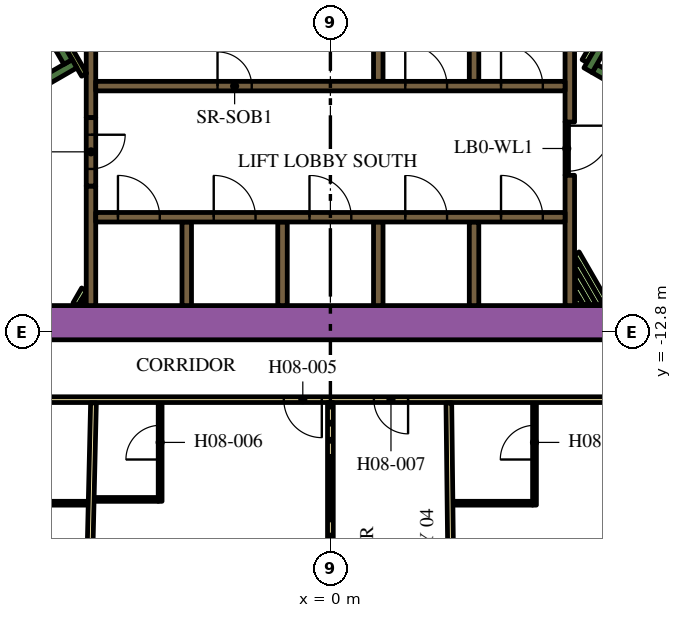
"""IFC4 building model, lengths in metres.
Left out: names, types, materials, properties, quantities, classifications, styles, units other than length and angle.
Written with IfcOpenShell. Run it as: python <this file> out.ifc"""

import sys

from ifc_helpers import new_model, si_unit, direction, frame, frame_2d, origin, place, context, subcontext, project, spatial, rectangle, extrude, element, fill, save


model = new_model("IFC4")
c1 = context("Model", 3, precision=1e-05, world=origin(), true_north=direction((0.0, 1.0)))
c2 = subcontext(c1, "Body", "Model", "MODEL_VIEW")
j1 = project(units=[si_unit("LENGTHUNIT", "METRE"), si_unit("PLANEANGLEUNIT", "RADIAN")], contexts=[c1])
p1 = place(None, origin())
s1 = spatial("IfcSite", under=j1, at=p1, CompositionType="ELEMENT")
p2 = place(p1, origin())
s2 = spatial("IfcBuilding", under=s1, at=p2, CompositionType="ELEMENT")
p3 = place(p2, frame((0.0, 0.0, 114.9)))
s3 = spatial("IfcBuildingStorey", under=s2, at=p3, CompositionType="ELEMENT", Elevation=114.9)
p4 = place(p3, frame((-12.019, -12.55, 0.0), z_axis=(0.0, 0.0, 1.0), x_axis=(1.0, 0.0, 0.0)))
e1 = element("IfcWall", 1, at=p4, inside=s3, PredefinedType="SOLIDWALL", context=c2, shape_type="SweptSolid", body=[
    extrude(rectangle(XDim=22.083, YDim=0.9, at=frame_2d((11.042, 0.0))), origin(), (0.0, 0.0, 1.0), 3.9),
])
p5 = place(p3, frame((12.84, -9.261, 0.0), z_axis=(0.0, 0.0, 1.0), x_axis=(-0.866013990052, 0.500019768644, 0.0)))
e2 = element("IfcWall", 2, at=p5, inside=s3, PredefinedType="SOLIDWALL", context=c2, shape_type="SweptSolid", body=[
    extrude(rectangle(XDim=6.8, YDim=0.25, at=frame_2d((3.4, 0.0))), origin(), (0.0, 0.0, 1.0), 3.9),
])
p6 = place(p3, frame((6.78, -5.906, 0.0), z_axis=(0.0, 0.0, 1.0), x_axis=(0.500223362819, 0.865896406789, 0.0)))
e3 = element("IfcWall", 3, at=p6, inside=s3, PredefinedType="SOLIDWALL", context=c2, shape_type="SweptSolid", body=[
    extrude(rectangle(XDim=0.675, YDim=0.25, at=frame_2d((0.337, 0.0))), origin(), (0.0, 0.0, 1.0), 3.9),
])
p7 = place(p3, frame((-12.84, -9.261, 0.0), z_axis=(0.0, 0.0, 1.0), x_axis=(0.866016039709, 0.500016218704, 0.0)))
e4 = element("IfcWall", 4, at=p7, inside=s3, PredefinedType="SOLIDWALL", context=c2, shape_type="SweptSolid", body=[
    extrude(rectangle(XDim=7.05, YDim=0.25, at=frame_2d((3.525, 0.0))), origin(), (0.0, 0.0, 1.0), 3.9),
])
p8 = place(p3, frame((-6.905, -5.69, 0.0), z_axis=(0.0, 0.0, 1.0), x_axis=(-0.500402024738, 0.865793170242, 0.0)))
e5 = element("IfcWall", 5, at=p8, inside=s3, PredefinedType="SOLIDWALL", context=c2, shape_type="SweptSolid", body=[
    extrude(rectangle(XDim=0.425, YDim=0.25, at=frame_2d((0.212, 0.0))), origin(), (0.0, 0.0, 1.0), 3.9),
])
p9 = place(p3, frame((-3.78, -12.1, 0.0), z_axis=(0.0, 0.0, 1.0), x_axis=(0.0, 1.0, 0.0)))
e6 = element("IfcWall", 6, at=p9, inside=s3, PredefinedType="SOLIDWALL", context=c2, shape_type="SweptSolid", body=[
    extrude(rectangle(XDim=2.2, YDim=0.25, at=frame_2d((1.1, 0.0))), origin(), (0.0, 0.0, 1.0), 3.9),
])
p10 = place(p3, frame((-6.3, -12.1, 0.0), z_axis=(0.0, 0.0, 1.0), x_axis=(0.0, 1.0, 0.0)))
e7 = element("IfcWall", 7, at=p10, inside=s3, PredefinedType="SOLIDWALL", context=c2, shape_type="SweptSolid", body=[
    extrude(rectangle(XDim=3.146, YDim=0.25, at=frame_2d((1.573, 0.0))), origin(), (0.0, 0.0, 1.0), 3.9),
])
for number, where, z_axis, x_axis in (
    (8, (3.78, -4.0, 0.0), (0.0, 0.0, 1.0), (0.0, -1.0, 0.0)),
    (9, (1.26, -4.0, 0.0), (0.0, 0.0, 1.0), (0.0, -1.0, 0.0)),
):
    element("IfcWall", number, at=place(p3, frame(where, z_axis=z_axis, x_axis=x_axis)), inside=s3, PredefinedType="SOLIDWALL", context=c2, shape_type="SweptSolid", body=[
        extrude(rectangle(XDim=2.2, YDim=0.25, at=frame_2d((1.1, 0.0))), origin(), (0.0, 0.0, 1.0), 3.9),
    ])
p11 = place(p3, frame((-6.3, -3.75, 0.0), z_axis=(0.0, 0.0, 1.0), x_axis=(0.0, -1.0, 0.0)))
e10 = element("IfcWall", 10, at=p11, inside=s3, PredefinedType="SOLIDWALL", context=c2, shape_type="SweptSolid", body=[
    extrude(rectangle(XDim=3.404, YDim=0.25, at=frame_2d((1.702, 0.0))), origin(), (0.0, 0.0, 1.0), 3.9),
])
p12 = place(p3, frame((6.3, -7.27, 0.0), z_axis=(0.0, 0.0, 1.0), x_axis=(0.0, 1.0, 0.0)))
e11 = element("IfcWall", 11, at=p12, inside=s3, PredefinedType="SOLIDWALL", context=c2, shape_type="SweptSolid", body=[
    extrude(rectangle(XDim=3.586, YDim=0.25, at=frame_2d((1.793, 0.0))), origin(), (0.0, 0.0, 1.0), 3.9),
])
p13 = place(p3, frame((6.3, -12.1, 0.0), z_axis=(0.0, 0.0, 1.0), x_axis=(0.0, 1.0, 0.0)))
e12 = element("IfcWall", 12, at=p13, inside=s3, PredefinedType="SOLIDWALL", context=c2, shape_type="SweptSolid", body=[
    extrude(rectangle(XDim=3.428, YDim=0.25, at=frame_2d((1.714, 0.0))), origin(), (0.0, 0.0, 1.0), 3.9),
])
for number, where, z_axis, x_axis in (
    (13, (3.78, -12.1, 0.0), (0.0, 0.0, 1.0), (0.0, 1.0, 0.0)),
    (14, (1.26, -12.1, 0.0), (0.0, 0.0, 1.0), (0.0, 1.0, 0.0)),
    (15, (-1.26, -12.1, 0.0), (0.0, 0.0, 1.0), (0.0, 1.0, 0.0)),
):
    element("IfcWall", number, at=place(p3, frame(where, z_axis=z_axis, x_axis=x_axis)), inside=s3, PredefinedType="SOLIDWALL", context=c2, shape_type="SweptSolid", body=[
        extrude(rectangle(XDim=2.2, YDim=0.25, at=frame_2d((1.1, 0.0))), origin(), (0.0, 0.0, 1.0), 3.9),
    ])
p14 = place(p3, frame((-6.708, -12.068, 0.0), z_axis=(0.0, 0.0, 1.0), x_axis=(0.500000789788, 0.8660249478, 0.0)))
e16 = element("IfcWall", 16, at=p14, inside=s3, PredefinedType="PARTITIONING", context=c2, shape_type="SweptSolid", body=[
    extrude(rectangle(XDim=0.456, YDim=0.15, at=frame_2d((0.228, 0.0))), origin(), (0.0, 0.0, 1.0), 2.75),
])
p15 = place(p3, frame((-6.534, -12.068, 0.0), z_axis=(0.0, 0.0, 1.0), x_axis=(0.500240224089, 0.865886665912, 0.0)))
e17 = element("IfcWall", 17, at=p15, inside=s3, PredefinedType="PARTITIONING", context=c2, shape_type="SweptSolid", body=[
    extrude(rectangle(XDim=0.109, YDim=0.15, at=frame_2d((0.054, 0.0))), origin(), (0.0, 0.0, 1.0), 2.75),
])
p16 = place(p3, frame((-6.48, -6.027, 0.0), z_axis=(0.0, 0.0, 1.0), x_axis=(-0.499927229454, 0.866067413802, 0.0)))
e18 = element("IfcWall", 18, at=p16, inside=s3, PredefinedType="PARTITIONING", context=c2, shape_type="SweptSolid", body=[
    extrude(rectangle(XDim=0.929, YDim=0.15, at=frame_2d((0.464, 0.0))), origin(), (0.0, 0.0, 1.0), 3.9),
])
p17 = place(p3, frame((6.48, -10.726, 0.0), z_axis=(0.0, 0.0, 1.0), x_axis=(0.500017819788, -0.86601511528, 0.0)))
e19 = element("IfcWall", 19, at=p17, inside=s3, PredefinedType="PARTITIONING", context=c2, shape_type="SweptSolid", body=[
    extrude(rectangle(XDim=1.55, YDim=0.15, at=frame_2d((0.775, 0.0))), origin(), (0.0, 0.0, 1.0), 2.75),
])
p18 = place(p3, frame((6.48, -11.026, 0.0), z_axis=(0.0, 0.0, 1.0), x_axis=(0.49995654735, -0.86605048973, 0.0)))
e20 = element("IfcWall", 20, at=p18, inside=s3, PredefinedType="PARTITIONING", context=c2, shape_type="SweptSolid", body=[
    extrude(rectangle(XDim=1.204, YDim=0.15, at=frame_2d((0.602, 0.0))), origin(), (0.0, 0.0, 1.0), 2.75),
])
p19 = place(p3, frame((6.48, -11.326, 0.0), z_axis=(0.0, 0.0, 1.0), x_axis=(0.500059337743, -0.865991142412, 0.0)))
e21 = element("IfcWall", 21, at=p19, inside=s3, PredefinedType="PARTITIONING", context=c2, shape_type="SweptSolid", body=[
    extrude(rectangle(XDim=0.857, YDim=0.15, at=frame_2d((0.429, 0.0))), origin(), (0.0, 0.0, 1.0), 2.75),
])
p20 = place(p3, frame((6.48, -11.626, 0.0), z_axis=(0.0, 0.0, 1.0), x_axis=(0.500301480982, -0.865851273677, 0.0)))
e22 = element("IfcWall", 22, at=p20, inside=s3, PredefinedType="PARTITIONING", context=c2, shape_type="SweptSolid", body=[
    extrude(rectangle(XDim=0.511, YDim=0.15, at=frame_2d((0.255, 0.0))), origin(), (0.0, 0.0, 1.0), 2.75),
])
p21 = place(p3, frame((6.48, -11.926, 0.0), z_axis=(0.0, 0.0, 1.0), x_axis=(0.500450775723, -0.86576499183, 0.0)))
e23 = element("IfcWall", 23, at=p21, inside=s3, PredefinedType="PARTITIONING", context=c2, shape_type="SweptSolid", body=[
    extrude(rectangle(XDim=0.164, YDim=0.15, at=frame_2d((0.082, 0.0))), origin(), (0.0, 0.0, 1.0), 2.75),
])
p22 = place(p3, frame((6.945, -5.222, 0.0), z_axis=(0.0, 0.0, 1.0), x_axis=(-0.499818422106, -0.866130212453, 0.0)))
e24 = element("IfcWall", 24, at=p22, inside=s3, PredefinedType="PARTITIONING", context=c2, shape_type="SweptSolid", body=[
    extrude(rectangle(XDim=0.514, YDim=0.15, at=frame_2d((0.257, 0.0))), origin(), (0.0, 0.0, 1.0), 2.75),
])
p23 = place(p3, frame((-6.175, -9.775, 0.0), z_axis=(0.0, 0.0, 1.0), x_axis=(1.0, 0.0, 0.0)))
e25 = element("IfcWall", 25, at=p23, inside=s3, PredefinedType="SOLIDWALL", context=c2, shape_type="SweptSolid", body=[
    extrude(rectangle(XDim=12.35, YDim=0.25, at=frame_2d((6.175, 0.0))), origin(), (0.0, 0.0, 1.0), 3.9),
])
p24 = place(p23, frame((0.585, 0.0, 0.0)))
e26 = element("IfcOpeningElement", 26, at=p24, cuts=e25, PredefinedType="OPENING", context=c2, shape_type="SweptSolid", body=[
    extrude(rectangle(XDim=1.1, YDim=2.1, at=frame_2d((0.55, 1.05))), frame((0.0, 0.135, 0.0), z_axis=(0.0, -1.0, 0.0), x_axis=(1.0, 0.0, 0.0)), (0.0, 0.0, 1.0), 0.27),
])
p25 = place(p23, frame((3.105, 0.0, 0.0)))
e27 = element("IfcOpeningElement", 27, at=p25, cuts=e25, PredefinedType="OPENING", context=c2, shape_type="SweptSolid", body=[
    extrude(rectangle(XDim=1.1, YDim=2.1, at=frame_2d((0.55, 1.05))), frame((0.0, 0.135, 0.0), z_axis=(0.0, -1.0, 0.0), x_axis=(1.0, 0.0, 0.0)), (0.0, 0.0, 1.0), 0.27),
])
p26 = place(p23, frame((5.625, 0.0, 0.0)))
e28 = element("IfcOpeningElement", 28, at=p26, cuts=e25, PredefinedType="OPENING", context=c2, shape_type="SweptSolid", body=[
    extrude(rectangle(XDim=1.1, YDim=2.1, at=frame_2d((0.55, 1.05))), frame((0.0, 0.135, 0.0), z_axis=(0.0, -1.0, 0.0), x_axis=(1.0, 0.0, 0.0)), (0.0, 0.0, 1.0), 0.27),
])
p27 = place(p23, frame((8.145, 0.0, 0.0)))
e29 = element("IfcOpeningElement", 29, at=p27, cuts=e25, PredefinedType="OPENING", context=c2, shape_type="SweptSolid", body=[
    extrude(rectangle(XDim=1.1, YDim=2.1, at=frame_2d((0.55, 1.05))), frame((0.0, 0.135, 0.0), z_axis=(0.0, -1.0, 0.0), x_axis=(1.0, 0.0, 0.0)), (0.0, 0.0, 1.0), 0.27),
])
p28 = place(p23, frame((10.665, 0.0, 0.0)))
e30 = element("IfcOpeningElement", 30, at=p28, cuts=e25, PredefinedType="OPENING", context=c2, shape_type="SweptSolid", body=[
    extrude(rectangle(XDim=1.1, YDim=2.1, at=frame_2d((0.55, 1.05))), frame((0.0, 0.135, 0.0), z_axis=(0.0, -1.0, 0.0), x_axis=(1.0, 0.0, 0.0)), (0.0, 0.0, 1.0), 0.27),
])
p29 = place(p3, frame((-6.175, -6.325, 0.0), z_axis=(0.0, 0.0, 1.0), x_axis=(1.0, 0.0, 0.0)))
e31 = element("IfcWall", 31, at=p29, inside=s3, PredefinedType="SOLIDWALL", context=c2, shape_type="SweptSolid", body=[
    extrude(rectangle(XDim=12.35, YDim=0.25, at=frame_2d((6.175, 0.0))), origin(), (0.0, 0.0, 1.0), 3.9),
])
p30 = place(p29, frame((3.205, 0.0, 0.0)))
e32 = element("IfcOpeningElement", 32, at=p30, cuts=e31, PredefinedType="OPENING", context=c2, shape_type="SweptSolid", body=[
    extrude(rectangle(XDim=0.9, YDim=2.1, at=frame_2d((0.45, 1.05))), frame((0.0, 0.135, 0.0), z_axis=(0.0, -1.0, 0.0), x_axis=(1.0, 0.0, 0.0)), (0.0, 0.0, 1.0), 0.27),
])
p31 = place(p29, frame((8.145, 0.0, 0.0)))
e33 = element("IfcOpeningElement", 33, at=p31, cuts=e31, PredefinedType="OPENING", context=c2, shape_type="SweptSolid", body=[
    extrude(rectangle(XDim=1.1, YDim=2.1, at=frame_2d((0.55, 1.05))), frame((0.0, 0.135, 0.0), z_axis=(0.0, -1.0, 0.0), x_axis=(1.0, 0.0, 0.0)), (0.0, 0.0, 1.0), 0.27),
])
p32 = place(p29, frame((10.665, 0.0, 0.0)))
e34 = element("IfcOpeningElement", 34, at=p32, cuts=e31, PredefinedType="OPENING", context=c2, shape_type="SweptSolid", body=[
    extrude(rectangle(XDim=1.1, YDim=2.1, at=frame_2d((0.55, 1.05))), frame((0.0, 0.135, 0.0), z_axis=(0.0, -1.0, 0.0), x_axis=(1.0, 0.0, 0.0)), (0.0, 0.0, 1.0), 0.27),
])
p33 = place(p3, frame((-6.3, -7.154, 0.0), z_axis=(0.0, 0.0, 1.0), x_axis=(0.0, -1.0, 0.0)))
e35 = element("IfcWall", 35, at=p33, inside=s3, PredefinedType="SOLIDWALL", context=c2, shape_type="SweptSolid", body=[
    extrude(rectangle(XDim=1.8, YDim=0.25, at=frame_2d((0.9, 0.0))), origin(), (0.0, 0.0, 1.0), 3.9),
])
p34 = place(p33, frame((0.45, 0.0, 0.0)))
e36 = element("IfcOpeningElement", 36, at=p34, cuts=e35, PredefinedType="OPENING", context=c2, shape_type="SweptSolid", body=[
    extrude(rectangle(XDim=0.9, YDim=2.1, at=frame_2d((0.45, 1.05))), frame((0.0, 0.135, 0.0), z_axis=(0.0, -1.0, 0.0), x_axis=(1.0, 0.0, 0.0)), (0.0, 0.0, 1.0), 0.27),
])
p35 = place(p3, frame((6.22, -7.266, 0.0), z_axis=(0.0, 0.0, 1.0), x_axis=(0.0, -1.0, 0.0)))
e37 = element("IfcWall", 37, at=p35, inside=s3, PredefinedType="PARTITIONING", context=c2, shape_type="SweptSolid", body=[
    extrude(rectangle(XDim=1.4, YDim=0.09, at=frame_2d((0.7, 0.0))), origin(), (0.0, 0.0, 1.0), 2.75),
])
p36 = place(p35, frame((0.1, 0.0, 0.0)))
e38 = element("IfcOpeningElement", 38, at=p36, cuts=e37, PredefinedType="OPENING", context=c2, shape_type="SweptSolid", body=[
    extrude(rectangle(XDim=1.2, YDim=2.1, at=frame_2d((0.6, 1.05))), frame((0.0, 0.055, 0.0), z_axis=(0.0, -1.0, 0.0), x_axis=(1.0, 0.0, 0.0)), (0.0, 0.0, 1.0), 0.11),
])
p37 = place(p3, frame((12.918, -14.575, 0.0), z_axis=(0.0, 0.0, 1.0), x_axis=(-1.0, 0.0, 0.0)))
e39 = element("IfcWall", 39, at=p37, inside=s3, PredefinedType="PARTITIONING", context=c2, shape_type="SweptSolid", body=[
    extrude(rectangle(XDim=25.766, YDim=0.15, at=frame_2d((12.883, 0.0))), origin(), (0.0, 0.0, 1.0), 2.75),
])
p38 = place(p37, frame((24.586, 0.0, 0.0)))
e40 = element("IfcOpeningElement", 40, at=p38, cuts=e39, PredefinedType="OPENING", context=c2, shape_type="SweptSolid", body=[
    extrude(rectangle(XDim=1.0, YDim=2.1, at=frame_2d((0.5, 1.05))), frame((0.0, 0.085, 0.0), z_axis=(0.0, -1.0, 0.0), x_axis=(1.0, 0.0, 0.0)), (0.0, 0.0, 1.0), 0.17),
])
p39 = place(p37, frame((13.144, 0.0, 0.0)))
e41 = element("IfcOpeningElement", 41, at=p39, cuts=e39, PredefinedType="OPENING", context=c2, shape_type="SweptSolid", body=[
    extrude(rectangle(XDim=1.0, YDim=2.1, at=frame_2d((0.5, 1.05))), frame((0.0, 0.085, 0.0), z_axis=(0.0, -1.0, 0.0), x_axis=(1.0, 0.0, 0.0)), (0.0, 0.0, 1.0), 0.17),
])
p40 = place(p37, frame((10.874, 0.0, 0.0)))
e42 = element("IfcOpeningElement", 42, at=p40, cuts=e39, PredefinedType="OPENING", context=c2, shape_type="SweptSolid", body=[
    extrude(rectangle(XDim=0.9, YDim=2.1, at=frame_2d((0.45, 1.05))), frame((0.0, 0.085, 0.0), z_axis=(0.0, -1.0, 0.0), x_axis=(1.0, 0.0, 0.0)), (0.0, 0.0, 1.0), 0.17),
])
p41 = place(p37, frame((0.596, 0.0, 0.0)))
e43 = element("IfcOpeningElement", 43, at=p41, cuts=e39, PredefinedType="OPENING", context=c2, shape_type="SweptSolid", body=[
    extrude(rectangle(XDim=1.0, YDim=2.1, at=frame_2d((0.5, 1.05))), frame((0.0, 0.085, 0.0), z_axis=(0.0, -1.0, 0.0), x_axis=(1.0, 0.0, 0.0)), (0.0, 0.0, 1.0), 0.17),
])
p42 = place(p3, frame((-6.389, -21.269, 0.0), z_axis=(0.0, 0.0, 1.0), x_axis=(0.023377429176, 0.999726710559, 0.0)))
e44 = element("IfcWall", 44, at=p42, inside=s3, PredefinedType="PARTITIONING", context=c2, shape_type="SweptSolid", body=[
    extrude(rectangle(XDim=6.611, YDim=0.15, at=frame_2d((3.305, 0.0))), origin(), (0.0, 0.0, 1.0), 2.75),
])
p43 = place(p3, frame((0.0, -21.344, 0.0), z_axis=(0.0, 0.0, 1.0), x_axis=(0.0, 1.0, 0.0)))
e45 = element("IfcWall", 45, at=p43, inside=s3, PredefinedType="PARTITIONING", context=c2, shape_type="SweptSolid", body=[
    extrude(rectangle(XDim=6.694, YDim=0.15, at=frame_2d((3.347, 0.0))), origin(), (0.0, 0.0, 1.0), 2.75),
])
p44 = place(p3, frame((3.202, -21.916, 0.0), z_axis=(0.0, 0.0, 1.0), x_axis=(-0.011707696285, 0.999931462575, 0.0)))
e46 = element("IfcWall", 46, at=p44, inside=s3, PredefinedType="PARTITIONING", context=c2, shape_type="SweptSolid", body=[
    extrude(rectangle(XDim=7.257, YDim=0.15, at=frame_2d((3.628, 0.0))), origin(), (0.0, 0.0, 1.0), 2.75),
])
p45 = place(p3, frame((-8.438, -17.3, 0.0), z_axis=(0.0, 0.0, 1.0), x_axis=(1.0, 0.0, 0.0)))
e47 = element("IfcWall", 47, at=p45, inside=s3, PredefinedType="PARTITIONING", context=c2, shape_type="SweptSolid", body=[
    extrude(rectangle(XDim=2.06, YDim=0.1, at=frame_2d((1.03, 0.0))), origin(), (0.0, 0.0, 1.0), 2.75),
])
p46 = place(p3, frame((-4.48, -17.25, 0.0), z_axis=(0.0, 0.0, 1.0), x_axis=(0.0, 1.0, 0.0)))
e48 = element("IfcWall", 48, at=p46, inside=s3, PredefinedType="PARTITIONING", context=c2, shape_type="SweptSolid", body=[
    extrude(rectangle(XDim=2.6, YDim=0.1, at=frame_2d((1.3, 0.0))), origin(), (0.0, 0.0, 1.0), 2.75),
])
p47 = place(p46, frame((1.1, 0.0, 0.0)))
e49 = element("IfcOpeningElement", 49, at=p47, cuts=e48, PredefinedType="OPENING", context=c2, shape_type="SweptSolid", body=[
    extrude(rectangle(XDim=0.9, YDim=2.1, at=frame_2d((0.45, 1.05))), frame((0.0, 0.06, 0.0), z_axis=(0.0, -1.0, 0.0), x_axis=(1.0, 0.0, 0.0)), (0.0, 0.0, 1.0), 0.12),
])
p48 = place(p3, frame((-4.53, -17.2, 0.0), z_axis=(0.0, 0.0, 1.0), x_axis=(-1.0, 0.0, 0.0)))
e50 = element("IfcWall", 50, at=p48, inside=s3, PredefinedType="PARTITIONING", context=c2, shape_type="SweptSolid", body=[
    extrude(rectangle(XDim=1.68, YDim=0.1, at=frame_2d((0.84, 0.0))), origin(), (0.0, 0.0, 1.0), 2.75),
])
p49 = place(p3, frame((5.371, -17.35, 0.0), z_axis=(0.0, 0.0, 1.0), x_axis=(0.0, 1.0, 0.0)))
e51 = element("IfcWall", 51, at=p49, inside=s3, PredefinedType="PARTITIONING", context=c2, shape_type="SweptSolid", body=[
    extrude(rectangle(XDim=2.7, YDim=0.1, at=frame_2d((1.35, 0.0))), origin(), (0.0, 0.0, 1.0), 2.75),
])
p50 = place(p49, frame((1.2, 0.0, 0.0)))
e52 = element("IfcOpeningElement", 52, at=p50, cuts=e51, PredefinedType="OPENING", context=c2, shape_type="SweptSolid", body=[
    extrude(rectangle(XDim=0.9, YDim=2.1, at=frame_2d((0.45, 1.05))), frame((0.0, 0.06, 0.0), z_axis=(0.0, -1.0, 0.0), x_axis=(1.0, 0.0, 0.0)), (0.0, 0.0, 1.0), 0.12),
])
p51 = place(p3, frame((5.321, -17.3, 0.0), z_axis=(0.0, 0.0, 1.0), x_axis=(-1.0, 0.0, 0.0)))
e53 = element("IfcWall", 53, at=p51, inside=s3, PredefinedType="PARTITIONING", context=c2, shape_type="SweptSolid", body=[
    extrude(rectangle(XDim=2.09, YDim=0.1, at=frame_2d((1.045, 0.0))), origin(), (0.0, 0.0, 1.0), 2.75),
])
p52 = place(p24, origin())
e54 = element("IfcDoor", 54, at=p52, inside=s3, OperationType="DOUBLE_DOOR_SLIDING", PredefinedType="DOOR", context=c2, shape_type="SweptSolid", body=[
    extrude(rectangle(XDim=1.1, YDim=2.1, at=frame_2d((0.55, 1.05))), frame((0.0, 0.025, 0.0), z_axis=(0.0, -1.0, 0.0), x_axis=(1.0, 0.0, 0.0)), (0.0, 0.0, 1.0), 0.05),
])
fill(e26, e54)
p53 = place(p25, origin())
e55 = element("IfcDoor", 55, at=p53, inside=s3, OperationType="DOUBLE_DOOR_SLIDING", PredefinedType="DOOR", context=c2, shape_type="SweptSolid", body=[
    extrude(rectangle(XDim=1.1, YDim=2.1, at=frame_2d((0.55, 1.05))), frame((0.0, 0.025, 0.0), z_axis=(0.0, -1.0, 0.0), x_axis=(1.0, 0.0, 0.0)), (0.0, 0.0, 1.0), 0.05),
])
fill(e27, e55)
p54 = place(p26, origin())
e56 = element("IfcDoor", 56, at=p54, inside=s3, OperationType="DOUBLE_DOOR_SLIDING", PredefinedType="DOOR", context=c2, shape_type="SweptSolid", body=[
    extrude(rectangle(XDim=1.1, YDim=2.1, at=frame_2d((0.55, 1.05))), frame((0.0, 0.025, 0.0), z_axis=(0.0, -1.0, 0.0), x_axis=(1.0, 0.0, 0.0)), (0.0, 0.0, 1.0), 0.05),
])
fill(e28, e56)
p55 = place(p27, origin())
e57 = element("IfcDoor", 57, at=p55, inside=s3, OperationType="DOUBLE_DOOR_SLIDING", PredefinedType="DOOR", context=c2, shape_type="SweptSolid", body=[
    extrude(rectangle(XDim=1.1, YDim=2.1, at=frame_2d((0.55, 1.05))), frame((0.0, 0.025, 0.0), z_axis=(0.0, -1.0, 0.0), x_axis=(1.0, 0.0, 0.0)), (0.0, 0.0, 1.0), 0.05),
])
fill(e29, e57)
p56 = place(p28, origin())
e58 = element("IfcDoor", 58, at=p56, inside=s3, OperationType="DOUBLE_DOOR_SLIDING", PredefinedType="DOOR", context=c2, shape_type="SweptSolid", body=[
    extrude(rectangle(XDim=1.1, YDim=2.1, at=frame_2d((0.55, 1.05))), frame((0.0, 0.025, 0.0), z_axis=(0.0, -1.0, 0.0), x_axis=(1.0, 0.0, 0.0)), (0.0, 0.0, 1.0), 0.05),
])
fill(e30, e58)
p57 = place(p30, origin())
e59 = element("IfcDoor", 59, at=p57, inside=s3, OperationType="SINGLE_SWING_LEFT", PredefinedType="DOOR", context=c2, shape_type="SweptSolid", body=[
    extrude(rectangle(XDim=0.9, YDim=2.1, at=frame_2d((0.45, 1.05))), frame((0.0, 0.025, 0.0), z_axis=(0.0, -1.0, 0.0), x_axis=(1.0, 0.0, 0.0)), (0.0, 0.0, 1.0), 0.05),
])
fill(e32, e59)
p58 = place(p31, origin())
e60 = element("IfcDoor", 60, at=p58, inside=s3, OperationType="DOUBLE_DOOR_SLIDING", PredefinedType="DOOR", context=c2, shape_type="SweptSolid", body=[
    extrude(rectangle(XDim=1.1, YDim=2.1, at=frame_2d((0.55, 1.05))), frame((0.0, 0.025, 0.0), z_axis=(0.0, -1.0, 0.0), x_axis=(1.0, 0.0, 0.0)), (0.0, 0.0, 1.0), 0.05),
])
fill(e33, e60)
p59 = place(p32, origin())
e61 = element("IfcDoor", 61, at=p59, inside=s3, OperationType="DOUBLE_DOOR_SLIDING", PredefinedType="DOOR", context=c2, shape_type="SweptSolid", body=[
    extrude(rectangle(XDim=1.1, YDim=2.1, at=frame_2d((0.55, 1.05))), frame((0.0, 0.025, 0.0), z_axis=(0.0, -1.0, 0.0), x_axis=(1.0, 0.0, 0.0)), (0.0, 0.0, 1.0), 0.05),
])
fill(e34, e61)
p60 = place(p34, origin())
e62 = element("IfcDoor", 62, at=p60, inside=s3, OperationType="SINGLE_SWING_LEFT", PredefinedType="DOOR", context=c2, shape_type="SweptSolid", body=[
    extrude(rectangle(XDim=0.9, YDim=2.1, at=frame_2d((0.45, 1.05))), frame((0.0, 0.025, 0.0), z_axis=(0.0, -1.0, 0.0), x_axis=(1.0, 0.0, 0.0)), (0.0, 0.0, 1.0), 0.05),
])
fill(e36, e62)
p61 = place(p36, origin())
e63 = element("IfcDoor", 63, at=p61, inside=s3, OperationType="SINGLE_SWING_LEFT", PredefinedType="DOOR", context=c2, shape_type="SweptSolid", body=[
    extrude(rectangle(XDim=1.2, YDim=2.1, at=frame_2d((0.6, 1.05))), frame((0.0, 0.025, 0.0), z_axis=(0.0, -1.0, 0.0), x_axis=(1.0, 0.0, 0.0)), (0.0, 0.0, 1.0), 0.05),
])
fill(e38, e63)
p62 = place(p39, origin())
e64 = element("IfcDoor", 64, at=p62, inside=s3, OperationType="SINGLE_SWING_LEFT", PredefinedType="DOOR", context=c2, shape_type="SweptSolid", body=[
    extrude(rectangle(XDim=1.0, YDim=2.1, at=frame_2d((0.5, 1.05))), frame((0.0, 0.025, 0.0), z_axis=(0.0, -1.0, 0.0), x_axis=(1.0, 0.0, 0.0)), (0.0, 0.0, 1.0), 0.05),
])
fill(e41, e64)
p63 = place(p47, origin())
e65 = element("IfcDoor", 65, at=p63, inside=s3, OperationType="SINGLE_SWING_RIGHT", PredefinedType="DOOR", context=c2, shape_type="SweptSolid", body=[
    extrude(rectangle(XDim=0.9, YDim=2.1, at=frame_2d((0.45, 1.05))), frame((0.0, 0.025, 0.0), z_axis=(0.0, -1.0, 0.0), x_axis=(1.0, 0.0, 0.0)), (0.0, 0.0, 1.0), 0.05),
])
fill(e49, e65)
p64 = place(p40, origin())
e66 = element("IfcDoor", 66, at=p64, inside=s3, OperationType="SINGLE_SWING_RIGHT", PredefinedType="DOOR", context=c2, shape_type="SweptSolid", body=[
    extrude(rectangle(XDim=0.9, YDim=2.1, at=frame_2d((0.45, 1.05))), frame((0.0, 0.025, 0.0), z_axis=(0.0, -1.0, 0.0), x_axis=(1.0, 0.0, 0.0)), (0.0, 0.0, 1.0), 0.05),
])
fill(e42, e66)
p65 = place(p50, origin())
e67 = element("IfcDoor", 67, at=p65, inside=s3, OperationType="SINGLE_SWING_LEFT", PredefinedType="DOOR", context=c2, shape_type="SweptSolid", body=[
    extrude(rectangle(XDim=0.9, YDim=2.1, at=frame_2d((0.45, 1.05))), frame((0.0, 0.025, 0.0), z_axis=(0.0, -1.0, 0.0), x_axis=(1.0, 0.0, 0.0)), (0.0, 0.0, 1.0), 0.05),
])
fill(e52, e67)
save(model, sys.argv[1])
